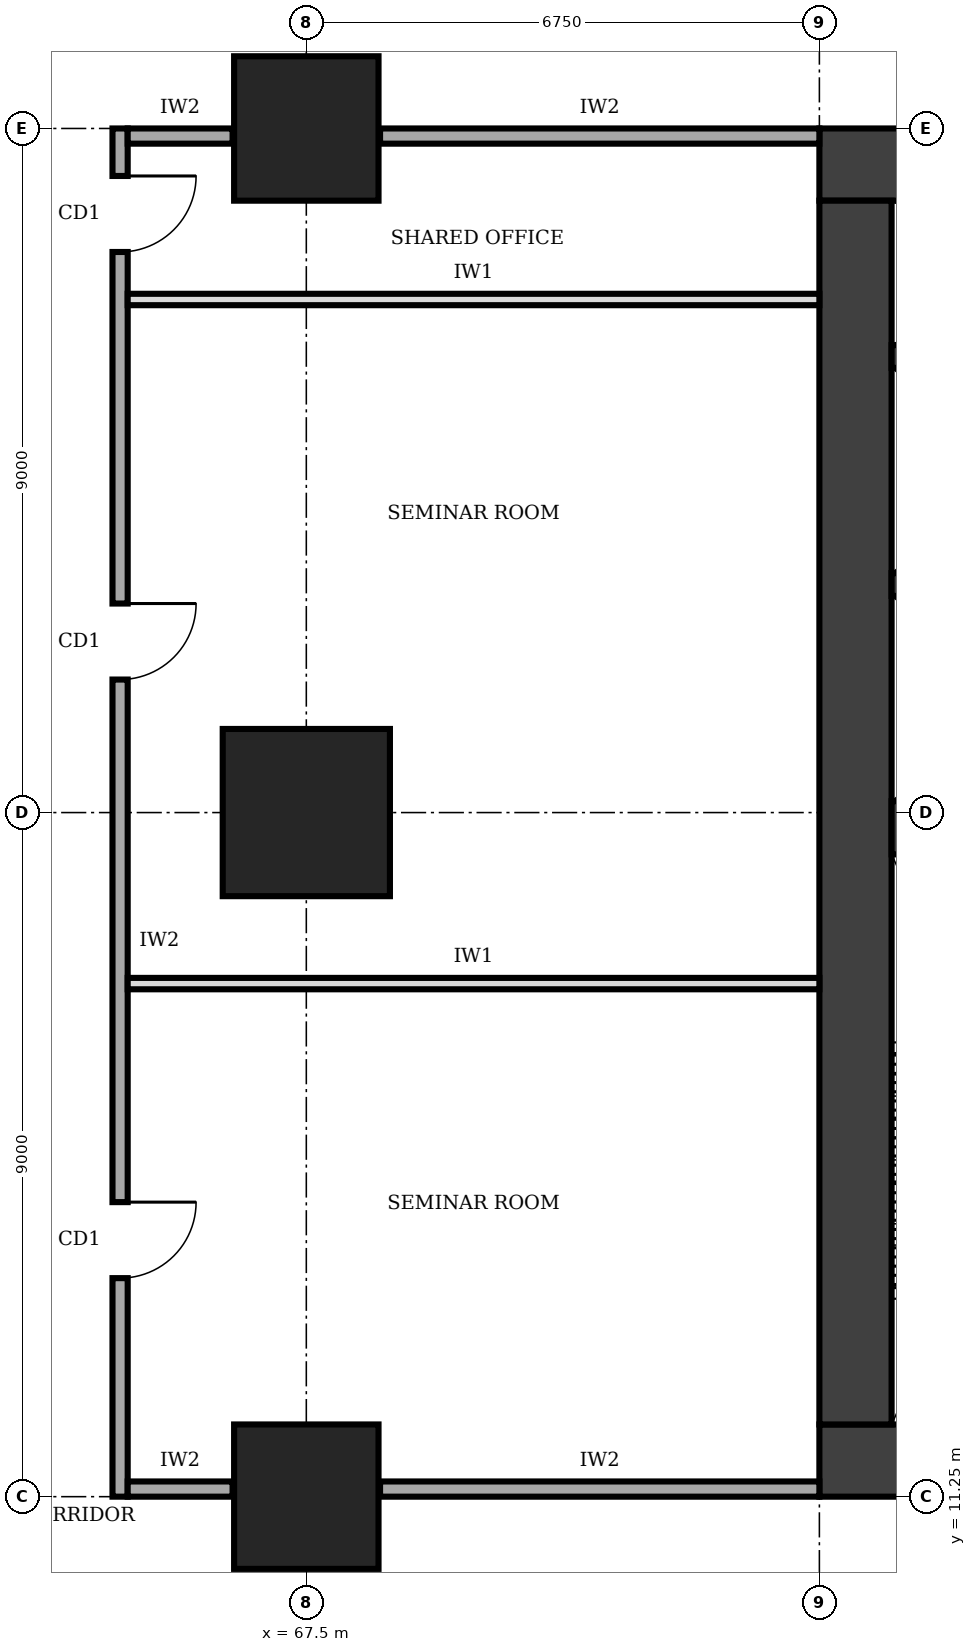
"""IFC4 building model, lengths in metres.
Left out: names, types, materials, properties, quantities, classifications, styles, units other than length and angle.
Written with IfcOpenShell. Run it as: python <this file> out.ifc"""

import sys

from ifc_helpers import new_model, si_unit, direction, frame, frame_2d, origin, origin_2d, place, context, subcontext, project, spatial, rectangle, extrude, element, fill, save


model = new_model("IFC4")
c1 = context("Model", 3, precision=1e-05, world=origin(), true_north=direction((0.0, 1.0)))
c2 = subcontext(c1, "Body", "Model", "MODEL_VIEW")
j1 = project(units=[si_unit("LENGTHUNIT", "METRE"), si_unit("PLANEANGLEUNIT", "RADIAN")], contexts=[c1])
p1 = place(None, origin())
s1 = spatial("IfcSite", under=j1, at=p1, CompositionType="ELEMENT")
p2 = place(p1, origin())
s2 = spatial("IfcBuilding", under=s1, at=p2, CompositionType="ELEMENT")
p3 = place(p2, frame((0.0, 0.0, 141.0)))
s3 = spatial("IfcBuildingStorey", under=s2, at=p3, CompositionType="ELEMENT", Elevation=141.0)
p4 = place(p3, frame((74.25, 11.725, 0.0), z_axis=(0.0, 0.0, 1.0), x_axis=(1.0, 0.0, 0.0)))
e1 = element("IfcWall", 1, at=p4, inside=s3, PredefinedType="SHEAR", context=c2, shape_type="SweptSolid", body=[
    extrude(rectangle(XDim=13.5, YDim=0.95, at=frame_2d((6.75, 0.0))), origin(), (0.0, 0.0, 1.0), 4.0),
])
p5 = place(p4, frame((4.75, 0.0, 0.0)))
e2 = element("IfcOpeningElement", 2, at=p5, cuts=e1, PredefinedType="OPENING", context=c2, shape_type="SweptSolid", body=[
    extrude(rectangle(XDim=1.0, YDim=2.1, at=frame_2d((0.5, 1.05))), frame((0.0, 0.485, 0.0), z_axis=(0.0, -1.0, 0.0), x_axis=(1.0, 0.0, 0.0)), (0.0, 0.0, 1.0), 0.97),
])
p6 = place(p3, frame((87.75, 28.775, 0.0), z_axis=(0.0, 0.0, 1.0), x_axis=(-1.0, 0.0, 0.0)))
e3 = element("IfcWall", 3, at=p6, inside=s3, PredefinedType="SHEAR", context=c2, shape_type="SweptSolid", body=[
    extrude(rectangle(XDim=13.5, YDim=0.95, at=frame_2d((6.75, 0.0))), origin(), (0.0, 0.0, 1.0), 4.0),
])
p7 = place(p6, frame((4.75, 0.0, 0.0)))
e4 = element("IfcOpeningElement", 4, at=p7, cuts=e3, PredefinedType="OPENING", context=c2, shape_type="SweptSolid", body=[
    extrude(rectangle(XDim=1.8, YDim=2.1, at=frame_2d((0.9, 1.05))), frame((0.0, 0.485, 0.0), z_axis=(0.0, -1.0, 0.0), x_axis=(1.0, 0.0, 0.0)), (0.0, 0.0, 1.0), 0.97),
])
p8 = place(p3, frame((74.725, 28.3, 0.0), z_axis=(0.0, 0.0, 1.0), x_axis=(0.0, -1.0, 0.0)))
e5 = element("IfcWall", 5, at=p8, inside=s3, PredefinedType="SHEAR", context=c2, shape_type="SweptSolid", body=[
    extrude(rectangle(XDim=16.1, YDim=0.95, at=frame_2d((8.05, 0.0))), origin(), (0.0, 0.0, 1.0), 4.0),
])
p9 = place(p3, frame((75.2, 20.05, 0.0), z_axis=(0.0, 0.0, 1.0), x_axis=(1.0, 0.0, 0.0)))
e6 = element("IfcWall", 6, at=p9, inside=s3, PredefinedType="SHEAR", context=c2, shape_type="SweptSolid", body=[
    extrude(rectangle(XDim=3.4, YDim=0.7, at=frame_2d((1.7, 0.0))), origin(), (0.0, 0.0, 1.0), 4.0),
])
for number, where, z_axis, x_axis in (
    (7, (75.2, 23.25, 0.0), (0.0, 0.0, 1.0), (1.0, 0.0, 0.0)),
    (8, (75.2, 26.25, 0.0), (0.0, 0.0, 1.0), (1.0, 0.0, 0.0)),
):
    element("IfcWall", number, at=place(p3, frame(where, z_axis=z_axis, x_axis=x_axis)), inside=s3, PredefinedType="SHEAR", context=c2, shape_type="SweptSolid", body=[
        extrude(rectangle(XDim=3.4, YDim=0.3, at=frame_2d((1.7, 0.0))), origin(), (0.0, 0.0, 1.0), 4.0),
    ])
p10 = place(p3, frame((67.5, 11.25, 0.0), z_axis=(0.0, 0.0, 1.0), x_axis=(1.0, 0.0, 0.0)))
e9 = element("IfcColumn", 9, at=p10, inside=s3, PredefinedType="COLUMN", context=c2, shape_type="SweptSolid", body=[
    extrude(rectangle(XDim=1.9, YDim=1.9, at=origin_2d()), origin(), (0.0, 0.0, 1.0), 4.0),
])
p11 = place(p3, frame((67.5, 20.25, 0.0), z_axis=(0.0, 0.0, 1.0), x_axis=(1.0, 0.0, 0.0)))
e10 = element("IfcColumn", 10, at=p11, inside=s3, PredefinedType="COLUMN", context=c2, shape_type="SweptSolid", body=[
    extrude(rectangle(XDim=2.2, YDim=2.2, at=origin_2d()), origin(), (0.0, 0.0, 1.0), 4.0),
])
p12 = place(p3, frame((67.5, 29.25, 0.0), z_axis=(0.0, 0.0, 1.0), x_axis=(1.0, 0.0, 0.0)))
e11 = element("IfcColumn", 11, at=p12, inside=s3, PredefinedType="COLUMN", context=c2, shape_type="SweptSolid", body=[
    extrude(rectangle(XDim=1.9, YDim=1.9, at=origin_2d()), origin(), (0.0, 0.0, 1.0), 4.0),
])
p13 = place(p3, frame((65.05, 29.25, 0.0), z_axis=(0.0, 0.0, 1.0), x_axis=(0.0, -1.0, 0.0)))
e12 = element("IfcWall", 12, at=p13, inside=s3, PredefinedType="SOLIDWALL", context=c2, shape_type="SweptSolid", body=[
    extrude(rectangle(XDim=18.0, YDim=0.2, at=frame_2d((9.0, 0.0))), origin(), (0.0, 0.0, 1.0), 3.75),
])
p14 = place(p13, frame((14.125, 0.0, 0.0)))
e13 = element("IfcOpeningElement", 13, at=p14, cuts=e12, PredefinedType="OPENING", context=c2, shape_type="SweptSolid", body=[
    extrude(rectangle(XDim=1.0, YDim=2.1, at=frame_2d((0.5, 1.05))), frame((0.0, 0.11, 0.0), z_axis=(0.0, -1.0, 0.0), x_axis=(1.0, 0.0, 0.0)), (0.0, 0.0, 1.0), 0.22),
])
p15 = place(p13, frame((6.25, 0.0, 0.0)))
e14 = element("IfcOpeningElement", 14, at=p15, cuts=e12, PredefinedType="OPENING", context=c2, shape_type="SweptSolid", body=[
    extrude(rectangle(XDim=1.0, YDim=2.1, at=frame_2d((0.5, 1.05))), frame((0.0, 0.11, 0.0), z_axis=(0.0, -1.0, 0.0), x_axis=(1.0, 0.0, 0.0)), (0.0, 0.0, 1.0), 0.22),
])
p16 = place(p13, frame((0.625, 0.0, 0.0)))
e15 = element("IfcOpeningElement", 15, at=p16, cuts=e12, PredefinedType="OPENING", context=c2, shape_type="SweptSolid", body=[
    extrude(rectangle(XDim=1.0, YDim=2.1, at=frame_2d((0.5, 1.05))), frame((0.0, 0.11, 0.0), z_axis=(0.0, -1.0, 0.0), x_axis=(1.0, 0.0, 0.0)), (0.0, 0.0, 1.0), 0.22),
])
p17 = place(p3, frame((65.15, 11.35, 0.0), z_axis=(0.0, 0.0, 1.0), x_axis=(1.0, 0.0, 0.0)))
e16 = element("IfcWall", 16, at=p17, inside=s3, PredefinedType="SOLIDWALL", context=c2, shape_type="SweptSolid", body=[
    extrude(rectangle(XDim=1.38, YDim=0.2, at=frame_2d((0.69, 0.0))), origin(), (0.0, 0.0, 1.0), 2.85),
])
p18 = place(p3, frame((68.47, 11.35, 0.0), z_axis=(0.0, 0.0, 1.0), x_axis=(1.0, 0.0, 0.0)))
e17 = element("IfcWall", 17, at=p18, inside=s3, PredefinedType="SOLIDWALL", context=c2, shape_type="SweptSolid", body=[
    extrude(rectangle(XDim=5.78, YDim=0.2, at=frame_2d((2.89, 0.0))), origin(), (0.0, 0.0, 1.0), 2.85),
])
p19 = place(p3, frame((65.15, 29.15, 0.0), z_axis=(0.0, 0.0, 1.0), x_axis=(1.0, 0.0, 0.0)))
e18 = element("IfcWall", 18, at=p19, inside=s3, PredefinedType="SOLIDWALL", context=c2, shape_type="SweptSolid", body=[
    extrude(rectangle(XDim=1.38, YDim=0.2, at=frame_2d((0.69, 0.0))), origin(), (0.0, 0.0, 1.0), 2.85),
])
p20 = place(p3, frame((68.47, 29.15, 0.0), z_axis=(0.0, 0.0, 1.0), x_axis=(1.0, 0.0, 0.0)))
e19 = element("IfcWall", 19, at=p20, inside=s3, PredefinedType="SOLIDWALL", context=c2, shape_type="SweptSolid", body=[
    extrude(rectangle(XDim=5.78, YDim=0.2, at=frame_2d((2.89, 0.0))), origin(), (0.0, 0.0, 1.0), 2.85),
])
for number, where, z_axis, x_axis in (
    (20, (65.15, 18.0, 0.0), (0.0, 0.0, 1.0), (1.0, 0.0, 0.0)),
    (21, (65.15, 27.0, 0.0), (0.0, 0.0, 1.0), (1.0, 0.0, 0.0)),
):
    element("IfcWall", number, at=place(p3, frame(where, z_axis=z_axis, x_axis=x_axis)), inside=s3, PredefinedType="PARTITIONING", context=c2, shape_type="SweptSolid", body=[
        extrude(rectangle(XDim=9.1, YDim=0.15, at=frame_2d((4.55, 0.0))), origin(), (0.0, 0.0, 1.0), 3.75),
    ])
p21 = place(p14, origin())
e22 = element("IfcDoor", 22, at=p21, inside=s3, OperationType="SINGLE_SWING_LEFT", PredefinedType="DOOR", context=c2, shape_type="SweptSolid", body=[
    extrude(rectangle(XDim=1.0, YDim=2.1, at=frame_2d((0.5, 1.05))), frame((0.0, 0.025, 0.0), z_axis=(0.0, -1.0, 0.0), x_axis=(1.0, 0.0, 0.0)), (0.0, 0.0, 1.0), 0.05),
])
fill(e13, e22)
p22 = place(p15, origin())
e23 = element("IfcDoor", 23, at=p22, inside=s3, OperationType="SINGLE_SWING_LEFT", PredefinedType="DOOR", context=c2, shape_type="SweptSolid", body=[
    extrude(rectangle(XDim=1.0, YDim=2.1, at=frame_2d((0.5, 1.05))), frame((0.0, 0.025, 0.0), z_axis=(0.0, -1.0, 0.0), x_axis=(1.0, 0.0, 0.0)), (0.0, 0.0, 1.0), 0.05),
])
fill(e14, e23)
p23 = place(p16, origin())
e24 = element("IfcDoor", 24, at=p23, inside=s3, OperationType="SINGLE_SWING_LEFT", PredefinedType="DOOR", context=c2, shape_type="SweptSolid", body=[
    extrude(rectangle(XDim=1.0, YDim=2.1, at=frame_2d((0.5, 1.05))), frame((0.0, 0.025, 0.0), z_axis=(0.0, -1.0, 0.0), x_axis=(1.0, 0.0, 0.0)), (0.0, 0.0, 1.0), 0.05),
])
fill(e15, e24)
save(model, sys.argv[1])
